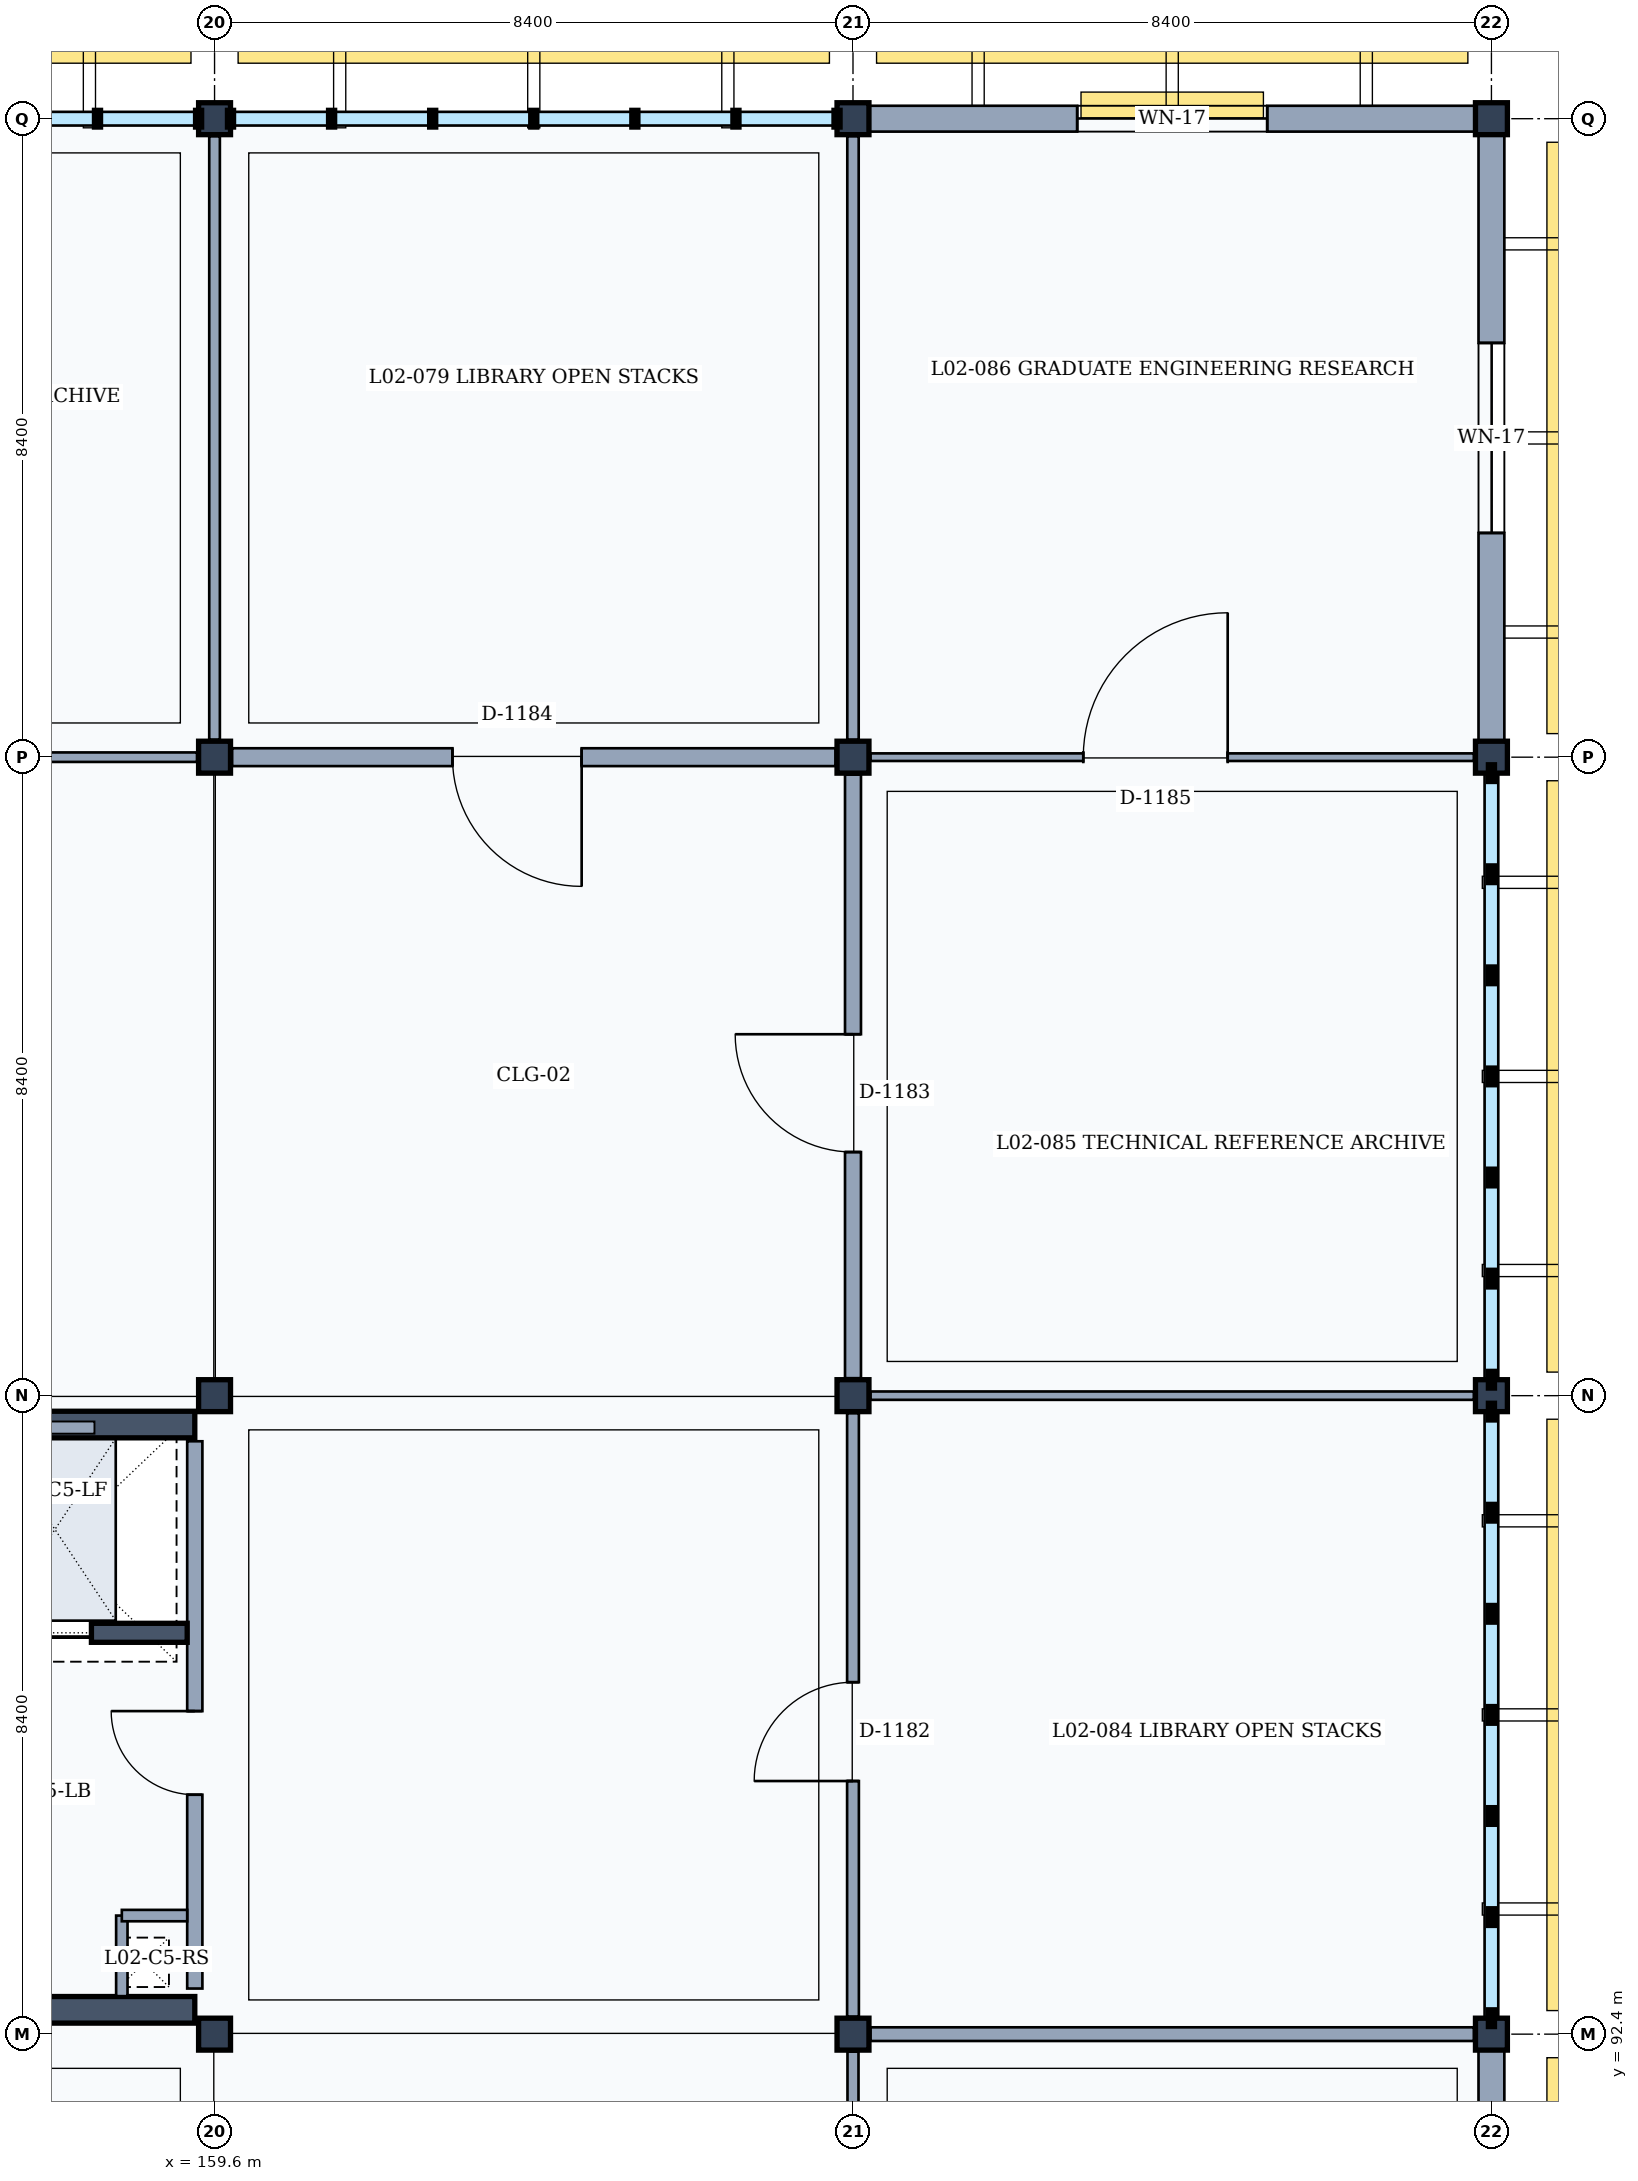
"""IFC4 building model, lengths in metres.
Left out: names, types, materials, properties, quantities, classifications, styles, units other than length and angle.
Written with IfcOpenShell. Run it as: python <this file> out.ifc"""

import sys

from ifc_helpers import new_model, si_unit, direction, frame, frame_2d, origin, origin_2d, place, context, subcontext, project, spatial, rectangle, extrude, element, fill, save


model = new_model("IFC4")
c1 = context("Model", 3, precision=1e-05, world=origin(), true_north=direction((0.0, 1.0)))
c2 = subcontext(c1, "Body", "Model", "MODEL_VIEW")
j1 = project(units=[si_unit("LENGTHUNIT", "METRE"), si_unit("PLANEANGLEUNIT", "RADIAN")], contexts=[c1])
p1 = place(None, origin())
s1 = spatial("IfcSite", under=j1, at=p1, CompositionType="ELEMENT")
p2 = place(p1, origin())
s2 = spatial("IfcBuilding", under=s1, at=p2, CompositionType="ELEMENT")
p3 = place(p2, frame((0.0, 0.0, 9.6)))
s3 = spatial("IfcBuildingStorey", under=s2, at=p3, CompositionType="ELEMENT", Elevation=9.6)
for number, where, z_axis, x_axis in (
    (1, (159.6, 92.4, 0.0), (0.0, 0.0, 1.0), (1.0, 0.0, 0.0)),
    (2, (159.6, 100.8, 0.0), (0.0, 0.0, 1.0), (1.0, 0.0, 0.0)),
    (3, (159.6, 109.2, 0.0), (0.0, 0.0, 1.0), (1.0, 0.0, 0.0)),
    (4, (159.6, 117.6, 0.0), (0.0, 0.0, 1.0), (1.0, 0.0, 0.0)),
    (5, (168.0, 92.4, 0.0), (0.0, 0.0, 1.0), (1.0, 0.0, 0.0)),
    (6, (168.0, 100.8, 0.0), (0.0, 0.0, 1.0), (1.0, 0.0, 0.0)),
    (7, (168.0, 109.2, 0.0), (0.0, 0.0, 1.0), (1.0, 0.0, 0.0)),
    (8, (168.0, 117.6, 0.0), (0.0, 0.0, 1.0), (1.0, 0.0, 0.0)),
    (9, (176.4, 92.4, 0.0), (0.0, 0.0, 1.0), (1.0, 0.0, 0.0)),
    (10, (176.4, 100.8, 0.0), (0.0, 0.0, 1.0), (1.0, 0.0, 0.0)),
    (11, (176.4, 109.2, 0.0), (0.0, 0.0, 1.0), (1.0, 0.0, 0.0)),
    (12, (176.4, 117.6, 0.0), (0.0, 0.0, 1.0), (1.0, 0.0, 0.0)),
):
    element("IfcColumn", number, at=place(p3, frame(where, z_axis=z_axis, x_axis=x_axis)), inside=s3, PredefinedType="COLUMN", context=c2, shape_type="SweptSolid", body=[
        extrude(rectangle(XDim=0.42, YDim=0.42, at=origin_2d()), origin(), (0.0, 0.0, 1.0), 4.2),
    ])
p4 = place(p3, frame((176.4, 92.19, 0.0), z_axis=(0.0, 0.0, 1.0), x_axis=(0.0, -1.0, 0.0)))
e13 = element("IfcWall", 13, at=p4, inside=s3, PredefinedType="SOLIDWALL", context=c2, shape_type="SweptSolid", body=[
    extrude(rectangle(XDim=7.98, YDim=0.34, at=frame_2d((3.99, 0.0))), origin(), (0.0, 0.0, 1.0), 3.36),
])
p5 = place(p4, frame((3.19, 0.0, 0.9)))
e14 = element("IfcOpeningElement", 14, at=p5, cuts=e13, PredefinedType="OPENING", context=c2, shape_type="SweptSolid", body=[
    extrude(rectangle(XDim=1.6, YDim=2.0, at=frame_2d((0.8, 1.0))), frame((0.0, 0.18, 0.0), z_axis=(0.0, -1.0, 0.0), x_axis=(1.0, 0.0, 0.0)), (0.0, 0.0, 1.0), 0.36),
])
p6 = place(p3, frame((168.21, 117.6, 0.0), z_axis=(0.0, 0.0, 1.0), x_axis=(1.0, 0.0, 0.0)))
e15 = element("IfcWall", 15, at=p6, inside=s3, PredefinedType="SOLIDWALL", context=c2, shape_type="SweptSolid", body=[
    extrude(rectangle(XDim=7.98, YDim=0.34, at=frame_2d((3.99, 0.0))), origin(), (0.0, 0.0, 1.0), 3.36),
])
p7 = place(p6, frame((2.74, 0.0, 0.9)))
e16 = element("IfcOpeningElement", 16, at=p7, cuts=e15, PredefinedType="OPENING", context=c2, shape_type="SweptSolid", body=[
    extrude(rectangle(XDim=2.5, YDim=2.0, at=frame_2d((1.25, 1.0))), frame((0.0, 0.18, 0.0), z_axis=(0.0, -1.0, 0.0), x_axis=(1.0, 0.0, 0.0)), (0.0, 0.0, 1.0), 0.36),
])
p8 = place(p3, frame((176.4, 117.39, 0.0), z_axis=(0.0, 0.0, 1.0), x_axis=(0.0, -1.0, 0.0)))
e17 = element("IfcWall", 17, at=p8, inside=s3, PredefinedType="SOLIDWALL", context=c2, shape_type="SweptSolid", body=[
    extrude(rectangle(XDim=7.98, YDim=0.34, at=frame_2d((3.99, 0.0))), origin(), (0.0, 0.0, 1.0), 3.36),
])
p9 = place(p8, frame((2.74, 0.0, 0.9)))
e18 = element("IfcOpeningElement", 18, at=p9, cuts=e17, PredefinedType="OPENING", context=c2, shape_type="SweptSolid", body=[
    extrude(rectangle(XDim=2.5, YDim=2.0, at=frame_2d((1.25, 1.0))), frame((0.0, 0.18, 0.0), z_axis=(0.0, -1.0, 0.0), x_axis=(1.0, 0.0, 0.0)), (0.0, 0.0, 1.0), 0.36),
])
p10 = place(p3, frame((151.465, 100.42, 0.0), z_axis=(0.0, 0.0, 1.0), x_axis=(1.0, 0.0, 0.0)))
e19 = element("IfcWall", 19, at=p10, inside=s3, PredefinedType="SHEAR", context=c2, shape_type="SweptSolid", body=[
    extrude(rectangle(XDim=7.875, YDim=0.35, at=frame_2d((3.938, 0.0))), origin(), (0.0, 0.0, 1.0), 3.96),
])
p11 = place(p3, frame((159.34, 100.2, 0.0), z_axis=(0.0, 0.0, 1.0), x_axis=(0.0, -1.0, 0.0)))
e20 = element("IfcWall", 20, at=p11, inside=s3, PredefinedType="PARTITIONING", context=c2, shape_type="SweptSolid", body=[
    extrude(rectangle(XDim=7.2, YDim=0.2, at=frame_2d((3.6, 0.0))), origin(), (0.0, 0.0, 1.0), 3.32),
])
p12 = place(p11, frame((3.55, 0.0, 0.0)))
e21 = element("IfcOpeningElement", 21, at=p12, cuts=e20, PredefinedType="OPENING", context=c2, shape_type="SweptSolid", body=[
    extrude(rectangle(XDim=1.1, YDim=2.15, at=frame_2d((0.55, 1.075))), frame((0.0, 0.11, 0.0), z_axis=(0.0, -1.0, 0.0), x_axis=(1.0, 0.0, 0.0)), (0.0, 0.0, 1.0), 0.22),
])
p13 = place(p3, frame((159.34, 92.72, 0.0), z_axis=(0.0, 0.0, 1.0), x_axis=(-1.0, 0.0, 0.0)))
e22 = element("IfcWall", 22, at=p13, inside=s3, PredefinedType="SHEAR", context=c2, shape_type="SweptSolid", body=[
    extrude(rectangle(XDim=7.875, YDim=0.35, at=frame_2d((3.938, 0.0))), origin(), (0.0, 0.0, 1.0), 3.96),
])
p14 = place(p3, frame((158.38, 93.96, 0.0), z_axis=(0.0, 0.0, 1.0), x_axis=(0.0, -1.0, 0.0)))
e23 = element("IfcWall", 23, at=p14, inside=s3, PredefinedType="PARTITIONING", context=c2, shape_type="SweptSolid", body=[
    extrude(rectangle(XDim=1.06, YDim=0.15, at=frame_2d((0.53, 0.0))), origin(), (0.0, 0.0, 1.0), 3.32),
])
p15 = place(p3, frame((158.38, 93.96, 0.0), z_axis=(0.0, 0.0, 1.0), x_axis=(1.0, 0.0, 0.0)))
e24 = element("IfcWall", 24, at=p15, inside=s3, PredefinedType="PARTITIONING", context=c2, shape_type="SweptSolid", body=[
    extrude(rectangle(XDim=0.86, YDim=0.15, at=frame_2d((0.43, 0.0))), origin(), (0.0, 0.0, 1.0), 3.32),
])
p16 = place(p3, frame((155.78, 97.68, 0.0), z_axis=(0.0, 0.0, 1.0), x_axis=(1.0, 0.0, 0.0)))
e25 = element("IfcWall", 25, at=p16, inside=s3, PredefinedType="SHEAR", context=c2, shape_type="SweptSolid", body=[
    extrude(rectangle(XDim=3.46, YDim=0.25, at=frame_2d((1.73, 0.0))), origin(), (0.0, 0.0, 1.0), 3.96),
])
p17 = place(p16, frame((1.1, 0.0, 0.0)))
e26 = element("IfcOpeningElement", 26, at=p17, cuts=e25, PredefinedType="OPENING", context=c2, shape_type="SweptSolid", body=[
    extrude(rectangle(XDim=1.1, YDim=2.15, at=frame_2d((0.55, 1.075))), frame((0.0, 0.135, 0.0), z_axis=(0.0, -1.0, 0.0), x_axis=(1.0, 0.0, 0.0)), (0.0, 0.0, 1.0), 0.27),
])
p18 = place(p3, frame((151.43, 109.2, 0.0), z_axis=(0.0, 0.0, 1.0), x_axis=(1.0, 0.0, 0.0)))
e27 = element("IfcWall", 27, at=p18, inside=s3, PredefinedType="PARTITIONING", context=c2, shape_type="SweptSolid", body=[
    extrude(rectangle(XDim=7.94, YDim=0.125, at=frame_2d((3.97, 0.0))), origin(), (0.0, 0.0, 1.0), 3.24),
])
p19 = place(p18, frame((3.15, 0.0, 0.0)))
e28 = element("IfcOpeningElement", 28, at=p19, cuts=e27, PredefinedType="OPENING", context=c2, shape_type="SweptSolid", body=[
    extrude(rectangle(XDim=1.2, YDim=2.2, at=frame_2d((0.6, 1.1))), frame((0.0, 0.073, 0.0), z_axis=(0.0, -1.0, 0.0), x_axis=(1.0, 0.0, 0.0)), (0.0, 0.0, 1.0), 0.145),
])
p20 = place(p3, frame((159.6, 109.43, 0.0), z_axis=(0.0, 0.0, 1.0), x_axis=(0.0, 1.0, 0.0)))
e29 = element("IfcWall", 29, at=p20, inside=s3, PredefinedType="PARTITIONING", context=c2, shape_type="SweptSolid", body=[
    extrude(rectangle(XDim=7.94, YDim=0.14, at=frame_2d((3.97, 0.0))), origin(), (0.0, 0.0, 1.0), 3.32),
])
p21 = place(p3, frame((168.0, 84.23, 0.0), z_axis=(0.0, 0.0, 1.0), x_axis=(0.0, 1.0, 0.0)))
e30 = element("IfcWall", 30, at=p21, inside=s3, PredefinedType="PARTITIONING", context=c2, shape_type="SweptSolid", body=[
    extrude(rectangle(XDim=7.94, YDim=0.145, at=frame_2d((3.97, 0.0))), origin(), (0.0, 0.0, 1.0), 3.32),
])
p22 = place(p21, frame((3.175, 0.0, 0.0)))
e31 = element("IfcOpeningElement", 31, at=p22, cuts=e30, PredefinedType="OPENING", context=c2, shape_type="SweptSolid", body=[
    extrude(rectangle(XDim=1.15, YDim=2.25, at=frame_2d((0.575, 1.125))), frame((0.0, 0.083, 0.0), z_axis=(0.0, -1.0, 0.0), x_axis=(1.0, 0.0, 0.0)), (0.0, 0.0, 1.0), 0.165),
])
p23 = place(p3, frame((168.0, 92.63, 0.0), z_axis=(0.0, 0.0, 1.0), x_axis=(0.0, 1.0, 0.0)))
e32 = element("IfcWall", 32, at=p23, inside=s3, PredefinedType="PARTITIONING", context=c2, shape_type="SweptSolid", body=[
    extrude(rectangle(XDim=7.94, YDim=0.155, at=frame_2d((3.97, 0.0))), origin(), (0.0, 0.0, 1.0), 3.32),
])
p24 = place(p23, frame((3.1, 0.0, 0.0)))
e33 = element("IfcOpeningElement", 33, at=p24, cuts=e32, PredefinedType="OPENING", context=c2, shape_type="SweptSolid", body=[
    extrude(rectangle(XDim=1.3, YDim=2.2, at=frame_2d((0.65, 1.1))), frame((0.0, 0.087, 0.0), z_axis=(0.0, -1.0, 0.0), x_axis=(1.0, 0.0, 0.0)), (0.0, 0.0, 1.0), 0.175),
])
p25 = place(p3, frame((168.0, 101.03, 0.0), z_axis=(0.0, 0.0, 1.0), x_axis=(0.0, 1.0, 0.0)))
e34 = element("IfcWall", 34, at=p25, inside=s3, PredefinedType="PARTITIONING", context=c2, shape_type="SweptSolid", body=[
    extrude(rectangle(XDim=7.94, YDim=0.21, at=frame_2d((3.97, 0.0))), origin(), (0.0, 0.0, 1.0), 3.32),
])
p26 = place(p25, frame((2.975, 0.0, 0.0)))
e35 = element("IfcOpeningElement", 35, at=p26, cuts=e34, PredefinedType="OPENING", context=c2, shape_type="SweptSolid", body=[
    extrude(rectangle(XDim=1.55, YDim=2.35, at=frame_2d((0.775, 1.175))), frame((0.0, 0.115, 0.0), z_axis=(0.0, -1.0, 0.0), x_axis=(1.0, 0.0, 0.0)), (0.0, 0.0, 1.0), 0.23),
])
p27 = place(p3, frame((159.83, 109.2, 0.0), z_axis=(0.0, 0.0, 1.0), x_axis=(1.0, 0.0, 0.0)))
e36 = element("IfcWall", 36, at=p27, inside=s3, PredefinedType="PARTITIONING", context=c2, shape_type="SweptSolid", body=[
    extrude(rectangle(XDim=7.94, YDim=0.235, at=frame_2d((3.97, 0.0))), origin(), (0.0, 0.0, 1.0), 3.24),
])
p28 = place(p27, frame((2.9, 0.0, 0.0)))
e37 = element("IfcOpeningElement", 37, at=p28, cuts=e36, PredefinedType="OPENING", context=c2, shape_type="SweptSolid", body=[
    extrude(rectangle(XDim=1.7, YDim=2.3, at=frame_2d((0.85, 1.15))), frame((0.0, 0.127, 0.0), z_axis=(0.0, -1.0, 0.0), x_axis=(1.0, 0.0, 0.0)), (0.0, 0.0, 1.0), 0.255),
])
p29 = place(p3, frame((168.0, 109.43, 0.0), z_axis=(0.0, 0.0, 1.0), x_axis=(0.0, 1.0, 0.0)))
e38 = element("IfcWall", 38, at=p29, inside=s3, PredefinedType="PARTITIONING", context=c2, shape_type="SweptSolid", body=[
    extrude(rectangle(XDim=7.94, YDim=0.15, at=frame_2d((3.97, 0.0))), origin(), (0.0, 0.0, 1.0), 3.32),
])
p30 = place(p3, frame((168.23, 92.4, 0.0), z_axis=(0.0, 0.0, 1.0), x_axis=(1.0, 0.0, 0.0)))
e39 = element("IfcWall", 39, at=p30, inside=s3, PredefinedType="PARTITIONING", context=c2, shape_type="SweptSolid", body=[
    extrude(rectangle(XDim=7.94, YDim=0.18, at=frame_2d((3.97, 0.0))), origin(), (0.0, 0.0, 1.0), 3.24),
])
p31 = place(p3, frame((168.23, 100.8, 0.0), z_axis=(0.0, 0.0, 1.0), x_axis=(1.0, 0.0, 0.0)))
e40 = element("IfcWall", 40, at=p31, inside=s3, PredefinedType="PARTITIONING", context=c2, shape_type="SweptSolid", body=[
    extrude(rectangle(XDim=7.94, YDim=0.11, at=frame_2d((3.97, 0.0))), origin(), (0.0, 0.0, 1.0), 3.24),
])
p32 = place(p3, frame((168.23, 109.2, 0.0), z_axis=(0.0, 0.0, 1.0), x_axis=(1.0, 0.0, 0.0)))
e41 = element("IfcWall", 41, at=p32, inside=s3, PredefinedType="MOVABLE", context=c2, shape_type="SweptSolid", body=[
    extrude(rectangle(XDim=7.94, YDim=0.1, at=frame_2d((3.97, 0.0))), origin(), (0.0, 0.0, 1.0), 3.24),
])
p33 = place(p32, frame((2.8, 0.0, 0.0)))
e42 = element("IfcOpeningElement", 42, at=p33, cuts=e41, PredefinedType="OPENING", context=c2, shape_type="SweptSolid", body=[
    extrude(rectangle(XDim=1.9, YDim=2.4, at=frame_2d((0.95, 1.2))), frame((0.0, 0.06, 0.0), z_axis=(0.0, -1.0, 0.0), x_axis=(1.0, 0.0, 0.0)), (0.0, 0.0, 1.0), 0.12),
])
p34 = place(p7, origin())
e43 = element("IfcWindow", 43, at=p34, inside=s3, PartitioningType="SINGLE_PANEL", PredefinedType="WINDOW", context=c2, shape_type="SweptSolid", body=[
    extrude(rectangle(XDim=2.5, YDim=2.0, at=frame_2d((1.25, 1.0))), frame((0.0, 0.03, 0.0), z_axis=(0.0, -1.0, 0.0), x_axis=(1.0, 0.0, 0.0)), (0.0, 0.0, 1.0), 0.06),
])
fill(e16, e43)
p35 = place(p9, origin())
e44 = element("IfcWindow", 44, at=p35, inside=s3, PartitioningType="SINGLE_PANEL", PredefinedType="WINDOW", context=c2, shape_type="SweptSolid", body=[
    extrude(rectangle(XDim=2.5, YDim=2.0, at=frame_2d((1.25, 1.0))), frame((0.0, 0.03, 0.0), z_axis=(0.0, -1.0, 0.0), x_axis=(1.0, 0.0, 0.0)), (0.0, 0.0, 1.0), 0.06),
])
fill(e18, e44)
p36 = place(p12, frame((1.1, 0.0, 0.0), z_axis=(0.0, 0.0, 1.0), x_axis=(-1.0, 0.0, 0.0)))
e45 = element("IfcDoor", 45, at=p36, inside=s3, OperationType="SINGLE_SWING_RIGHT", PredefinedType="DOOR", context=c2, shape_type="SweptSolid", body=[
    extrude(rectangle(XDim=1.1, YDim=2.15, at=frame_2d((0.55, 1.075))), frame((0.0, 0.025, 0.0), z_axis=(0.0, -1.0, 0.0), x_axis=(1.0, 0.0, 0.0)), (0.0, 0.0, 1.0), 0.05),
])
fill(e21, e45)
p37 = place(p17, origin())
e46 = element("IfcDoor", 46, at=p37, inside=s3, OperationType="DOUBLE_DOOR_SLIDING", PredefinedType="DOOR", context=c2, shape_type="SweptSolid", body=[
    extrude(rectangle(XDim=1.1, YDim=2.15, at=frame_2d((0.55, 1.075))), frame((0.0, 0.025, 0.0), z_axis=(0.0, -1.0, 0.0), x_axis=(1.0, 0.0, 0.0)), (0.0, 0.0, 1.0), 0.05),
])
fill(e26, e46)
p38 = place(p24, origin())
e47 = element("IfcDoor", 47, at=p38, inside=s3, OperationType="SINGLE_SWING_LEFT", PredefinedType="DOOR", context=c2, shape_type="SweptSolid", body=[
    extrude(rectangle(XDim=1.3, YDim=2.2, at=frame_2d((0.65, 1.1))), frame((0.0, 0.025, 0.0), z_axis=(0.0, -1.0, 0.0), x_axis=(1.0, 0.0, 0.0)), (0.0, 0.0, 1.0), 0.05),
])
fill(e33, e47)
p39 = place(p26, origin())
e48 = element("IfcDoor", 48, at=p39, inside=s3, OperationType="SINGLE_SWING_RIGHT", PredefinedType="DOOR", context=c2, shape_type="SweptSolid", body=[
    extrude(rectangle(XDim=1.55, YDim=2.35, at=frame_2d((0.775, 1.175))), frame((0.0, 0.025, 0.0), z_axis=(0.0, -1.0, 0.0), x_axis=(1.0, 0.0, 0.0)), (0.0, 0.0, 1.0), 0.05),
])
fill(e35, e48)
p40 = place(p28, frame((1.7, 0.0, 0.0), z_axis=(0.0, 0.0, 1.0), x_axis=(-1.0, 0.0, 0.0)))
e49 = element("IfcDoor", 49, at=p40, inside=s3, OperationType="SINGLE_SWING_LEFT", PredefinedType="DOOR", context=c2, shape_type="SweptSolid", body=[
    extrude(rectangle(XDim=1.7, YDim=2.3, at=frame_2d((0.85, 1.15))), frame((0.0, 0.025, 0.0), z_axis=(0.0, -1.0, 0.0), x_axis=(1.0, 0.0, 0.0)), (0.0, 0.0, 1.0), 0.05),
])
fill(e37, e49)
p41 = place(p33, origin())
e50 = element("IfcDoor", 50, at=p41, inside=s3, OperationType="SINGLE_SWING_RIGHT", PredefinedType="DOOR", context=c2, shape_type="SweptSolid", body=[
    extrude(rectangle(XDim=1.9, YDim=2.4, at=frame_2d((0.95, 1.2))), frame((0.0, 0.025, 0.0), z_axis=(0.0, -1.0, 0.0), x_axis=(1.0, 0.0, 0.0)), (0.0, 0.0, 1.0), 0.05),
])
fill(e42, e50)
save(model, sys.argv[1])
